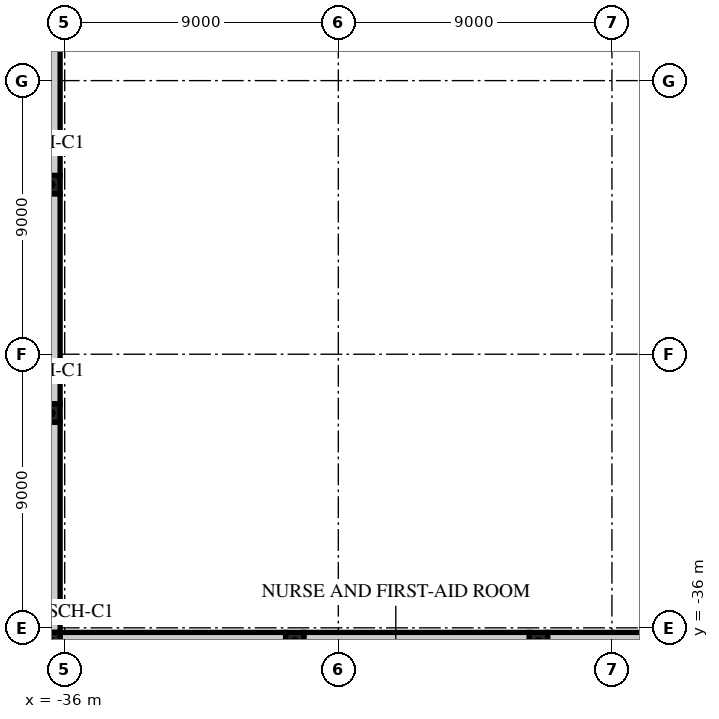
"""IFC4 building model, lengths in metres.
Left out: names, types, materials, properties, quantities, classifications, styles, units other than length and angle.
Written with IfcOpenShell. Run it as: python <this file> out.ifc"""

import sys

from ifc_helpers import new_model, si_unit, direction, frame, frame_2d, origin, origin_2d, place, context, subcontext, project, spatial, rectangle, extrude, element, fill, save


model = new_model("IFC4")
c1 = context("Model", 3, precision=1e-05, world=origin(), true_north=direction((0.0, 1.0)))
c2 = subcontext(c1, "Body", "Model", "MODEL_VIEW")
j1 = project(units=[si_unit("LENGTHUNIT", "METRE"), si_unit("PLANEANGLEUNIT", "RADIAN")], contexts=[c1])
p1 = place(None, origin())
s1 = spatial("IfcSite", under=j1, at=p1, CompositionType="ELEMENT")
p2 = place(p1, origin())
s2 = spatial("IfcBuilding", under=s1, at=p2, CompositionType="ELEMENT")
p3 = place(p2, origin())
s3 = spatial("IfcBuildingStorey", under=s2, at=p3, CompositionType="ELEMENT", Elevation=0.0)
p4 = place(p3, frame((-34.6, -27.0, 0.0), z_axis=(0.0, 0.0, 1.0), x_axis=(1.0, 0.0, 0.0)))
e1 = element("IfcColumn", 1, at=p4, inside=s3, PredefinedType="COLUMN", context=c2, shape_type="SweptSolid", body=[
    extrude(rectangle(XDim=0.625, YDim=0.625, at=origin_2d()), origin(), (0.0, 0.0, 1.0), 4.5),
])
p5 = place(p3, frame((-34.6, -18.0, 0.0), z_axis=(0.0, 0.0, 1.0), x_axis=(1.0, 0.0, 0.0)))
e2 = element("IfcColumn", 2, at=p5, inside=s3, PredefinedType="COLUMN", context=c2, shape_type="SweptSolid", body=[
    extrude(rectangle(XDim=0.725, YDim=0.725, at=origin_2d()), origin(), (0.0, 0.0, 1.0), 4.5),
])
p6 = place(p3, frame((-27.0, -34.6, 0.0), z_axis=(0.0, 0.0, 1.0), x_axis=(1.0, 0.0, 0.0)))
e3 = element("IfcColumn", 3, at=p6, inside=s3, PredefinedType="COLUMN", context=c2, shape_type="SweptSolid", body=[
    extrude(rectangle(XDim=0.7, YDim=0.7, at=origin_2d()), origin(), (0.0, 0.0, 1.0), 4.5),
])
p7 = place(p3, frame((-27.0, -27.0, 0.0), z_axis=(0.0, 0.0, 1.0), x_axis=(1.0, 0.0, 0.0)))
e4 = element("IfcColumn", 4, at=p7, inside=s3, PredefinedType="COLUMN", context=c2, shape_type="SweptSolid", body=[
    extrude(rectangle(XDim=0.875, YDim=0.875, at=origin_2d()), origin(), (0.0, 0.0, 1.0), 4.5),
])
p8 = place(p3, frame((-18.0, -34.6, 0.0), z_axis=(0.0, 0.0, 1.0), x_axis=(1.0, 0.0, 0.0)))
e5 = element("IfcColumn", 5, at=p8, inside=s3, PredefinedType="COLUMN", context=c2, shape_type="SweptSolid", body=[
    extrude(rectangle(XDim=0.7, YDim=0.7, at=origin_2d()), origin(), (0.0, 0.0, 1.0), 4.5),
])
p9 = place(p3, frame((-18.0, -27.0, 0.0), z_axis=(0.0, 0.0, 1.0), x_axis=(1.0, 0.0, 0.0)))
e6 = element("IfcColumn", 6, at=p9, inside=s3, PredefinedType="COLUMN", context=c2, shape_type="SweptSolid", body=[
    extrude(rectangle(XDim=0.85, YDim=0.85, at=origin_2d()), origin(), (0.0, 0.0, 1.0), 4.5),
])
p10 = place(p3, frame((-18.0, -18.0, 0.0), z_axis=(0.0, 0.0, 1.0), x_axis=(1.0, 0.0, 0.0)))
e7 = element("IfcColumn", 7, at=p10, inside=s3, PredefinedType="COLUMN", context=c2, shape_type="SweptSolid", body=[
    extrude(rectangle(XDim=0.875, YDim=0.875, at=origin_2d()), origin(), (0.0, 0.0, 1.0), 4.5),
])
p11 = place(p3, frame((-25.412, -17.307, 0.0), z_axis=(0.0, 0.0, 1.0), x_axis=(0.991001197216, 0.133853005627, 0.0)))
e8 = element("IfcColumn", 8, at=p11, inside=s3, PredefinedType="COLUMN", context=c2, shape_type="SweptSolid", body=[
    extrude(rectangle(XDim=1.575, YDim=1.575, at=origin_2d()), origin(), (0.0, 0.0, 1.0), 4.5),
])
p12 = place(p3, frame((-20.979, -27.531, 0.0), z_axis=(0.0, 0.0, 1.0), x_axis=(0.991001197216, 0.133853005627, 0.0)))
e9 = element("IfcColumn", 9, at=p12, inside=s3, PredefinedType="COLUMN", context=c2, shape_type="SweptSolid", body=[
    extrude(rectangle(XDim=2.3, YDim=2.3, at=origin_2d()), origin(), (0.0, 0.0, 1.0), 4.5),
])
p13 = place(p3, frame((-36.0, -18.0, 0.0), z_axis=(0.0, 0.0, 1.0), x_axis=(1.0, 0.0, 0.0)))
e10 = element("IfcWall", 10, at=p13, inside=s3, PredefinedType="PARTITIONING", context=c2, shape_type="SweptSolid", body=[
    extrude(rectangle(XDim=0.9, YDim=0.15, at=frame_2d((0.45, 0.0))), origin(), (0.0, 0.0, 1.0), 4.1),
])
p14 = place(p3, frame((-34.1, -18.0, 0.0), z_axis=(0.0, 0.0, 1.0), x_axis=(1.0, 0.0, 0.0)))
e11 = element("IfcWall", 11, at=p14, inside=s3, PredefinedType="PARTITIONING", context=c2, shape_type="SweptSolid", body=[
    extrude(rectangle(XDim=7.957, YDim=0.15, at=frame_2d((3.979, 0.0))), origin(), (0.0, 0.0, 1.0), 4.1),
])
p15 = place(p14, frame((6.6, 0.0, 0.0)))
e12 = element("IfcOpeningElement", 12, at=p15, cuts=e11, PredefinedType="OPENING", context=c2, shape_type="SweptSolid", body=[
    extrude(rectangle(XDim=1.0, YDim=2.1, at=frame_2d((0.5, 1.05))), frame((0.0, 0.085, 0.0), z_axis=(0.0, -1.0, 0.0), x_axis=(1.0, 0.0, 0.0)), (0.0, 0.0, 1.0), 0.17),
])
p16 = place(p3, frame((-24.681, -18.0, 0.0), z_axis=(0.0, 0.0, 1.0), x_axis=(1.0, 0.0, 0.0)))
e13 = element("IfcWall", 13, at=p16, inside=s3, PredefinedType="PARTITIONING", context=c2, shape_type="SweptSolid", body=[
    extrude(rectangle(XDim=6.181, YDim=0.15, at=frame_2d((3.09, 0.0))), origin(), (0.0, 0.0, 1.0), 4.1),
])
p17 = place(p3, frame((-17.5, -18.0, 0.0), z_axis=(0.0, 0.0, 1.0), x_axis=(1.0, 0.0, 0.0)))
e14 = element("IfcWall", 14, at=p17, inside=s3, PredefinedType="PARTITIONING", context=c2, shape_type="SweptSolid", body=[
    extrude(rectangle(XDim=8.0, YDim=0.15, at=frame_2d((4.0, 0.0))), origin(), (0.0, 0.0, 1.0), 4.1),
])
p18 = place(p17, frame((1.2, 0.0, 0.0)))
e15 = element("IfcOpeningElement", 15, at=p18, cuts=e14, PredefinedType="OPENING", context=c2, shape_type="SweptSolid", body=[
    extrude(rectangle(XDim=1.0, YDim=2.1, at=frame_2d((0.5, 1.05))), frame((0.0, 0.085, 0.0), z_axis=(0.0, -1.0, 0.0), x_axis=(1.0, 0.0, 0.0)), (0.0, 0.0, 1.0), 0.17),
])
p19 = place(p3, frame((-18.0, -36.0, 0.0), z_axis=(0.0, 0.0, 1.0), x_axis=(0.0, 1.0, 0.0)))
e16 = element("IfcWall", 16, at=p19, inside=s3, PredefinedType="PARTITIONING", context=c2, shape_type="SweptSolid", body=[
    extrude(rectangle(XDim=0.9, YDim=0.1, at=frame_2d((0.45, 0.0))), origin(), (0.0, 0.0, 1.0), 4.1),
])
p20 = place(p3, frame((-18.0, -34.1, 0.0), z_axis=(0.0, 0.0, 1.0), x_axis=(0.0, 1.0, 0.0)))
e17 = element("IfcWall", 17, at=p20, inside=s3, PredefinedType="PARTITIONING", context=c2, shape_type="SweptSolid", body=[
    extrude(rectangle(XDim=6.6, YDim=0.1, at=frame_2d((3.3, 0.0))), origin(), (0.0, 0.0, 1.0), 4.1),
])
p21 = place(p3, frame((-18.0, -26.5, 0.0), z_axis=(0.0, 0.0, 1.0), x_axis=(0.0, 1.0, 0.0)))
e18 = element("IfcWall", 18, at=p21, inside=s3, PredefinedType="PARTITIONING", context=c2, shape_type="SweptSolid", body=[
    extrude(rectangle(XDim=8.0, YDim=0.1, at=frame_2d((4.0, 0.0))), origin(), (0.0, 0.0, 1.0), 4.1),
])
for number, where, z_axis, x_axis in (
    (19, (-36.45, -36.45, -0.2), (0.0, 0.0, 1.0), (1.0, 0.0, 0.0)),
    (20, (-36.45, -28.936, -0.2), (0.0, 0.0, 1.0), (1.0, 0.0, 0.0)),
    (21, (-36.45, -21.421, -0.2), (0.0, 0.0, 1.0), (1.0, 0.0, 0.0)),
    (22, (-28.433, -36.45, -0.2), (0.0, 0.0, 1.0), (1.0, 0.0, 0.0)),
    (23, (-20.417, -36.45, -0.2), (0.0, 0.0, 1.0), (1.0, 0.0, 0.0)),
):
    element("IfcColumn", number, at=place(p3, frame(where, z_axis=z_axis, x_axis=x_axis)), inside=s3, PredefinedType="COLUMN", context=c2, shape_type="SweptSolid", body=[
        extrude(rectangle(XDim=0.6, YDim=0.6, at=origin_2d()), origin(), (0.0, 0.0, 1.0), 4.7),
    ])
for number, where, z_axis, x_axis in (
    (24, (-36.45, -14.207, -0.2), (0.0, 0.0, 1.0), (0.0, -1.0, 0.0)),
    (25, (-36.45, -21.721, -0.2), (0.0, 0.0, 1.0), (0.0, -1.0, 0.0)),
    (26, (-36.45, -29.236, -0.2), (0.0, 0.0, 1.0), (0.0, -1.0, 0.0)),
):
    element("IfcWall", number, at=place(p3, frame(where, z_axis=z_axis, x_axis=x_axis)), inside=s3, PredefinedType="STANDARD", context=c2, shape_type="SweptSolid", body=[
        extrude(rectangle(XDim=6.914, YDim=0.6, at=frame_2d((3.457, 0.0))), origin(), (0.0, 0.0, 1.0), 4.3),
    ])
for number, where, z_axis, x_axis in (
    (27, (-36.15, -36.45, -0.2), (0.0, 0.0, 1.0), (1.0, 0.0, 0.0)),
    (28, (-28.133, -36.45, -0.2), (0.0, 0.0, 1.0), (1.0, 0.0, 0.0)),
):
    element("IfcWall", number, at=place(p3, frame(where, z_axis=z_axis, x_axis=x_axis)), inside=s3, PredefinedType="STANDARD", context=c2, shape_type="SweptSolid", body=[
        extrude(rectangle(XDim=7.417, YDim=0.6, at=frame_2d((3.708, 0.0))), origin(), (0.0, 0.0, 1.0), 4.3),
    ])
p22 = place(p3, frame((-20.117, -36.45, -0.2), z_axis=(0.0, 0.0, 1.0), x_axis=(1.0, 0.0, 0.0)))
e29 = element("IfcWall", 29, at=p22, inside=s3, PredefinedType="STANDARD", context=c2, shape_type="SweptSolid", body=[
    extrude(rectangle(XDim=7.417, YDim=0.6, at=frame_2d((3.708, 0.0))), origin(), (0.0, 0.0, 1.0), 4.3),
])
p23 = place(p3, frame((-30.876, -35.7, 0.0), z_axis=(0.0, 0.0, 1.0), x_axis=(1.0, 0.0, 0.0)))
e30 = element("IfcWall", 30, at=p23, inside=s3, PredefinedType="STANDARD", context=c2, shape_type="SweptSolid", body=[
    extrude(rectangle(XDim=61.751, YDim=0.6, at=frame_2d((30.876, 0.0))), origin(), (0.0, 0.0, 1.0), 4.1),
])
p24 = place(p3, frame((-35.7, 18.0, 0.0), z_axis=(0.0, 0.0, 1.0), x_axis=(0.0, -1.0, 0.0)))
e31 = element("IfcWall", 31, at=p24, inside=s3, PredefinedType="STANDARD", context=c2, shape_type="SweptSolid", body=[
    extrude(rectangle(XDim=48.876, YDim=0.6, at=frame_2d((24.438, 0.0))), origin(), (0.0, 0.0, 1.0), 4.1),
])
p25 = place(p3, frame((-35.7, -30.876, 0.0), z_axis=(0.0, 0.0, 1.0), x_axis=(0.707106781187, -0.707106781187, 0.0)))
e32 = element("IfcWall", 32, at=p25, inside=s3, PredefinedType="STANDARD", context=c2, shape_type="SweptSolid", body=[
    extrude(rectangle(XDim=6.823, YDim=0.6, at=frame_2d((3.411, 0.0))), origin(), (0.0, 0.0, 1.0), 4.1),
])
p26 = place(p15, origin())
e33 = element("IfcDoor", 33, at=p26, inside=s3, OperationType="SINGLE_SWING_RIGHT", PredefinedType="DOOR", context=c2, shape_type="SweptSolid", body=[
    extrude(rectangle(XDim=1.0, YDim=2.1, at=frame_2d((0.5, 1.05))), frame((0.0, 0.025, 0.0), z_axis=(0.0, -1.0, 0.0), x_axis=(1.0, 0.0, 0.0)), (0.0, 0.0, 1.0), 0.05),
])
fill(e12, e33)
save(model, sys.argv[1])
